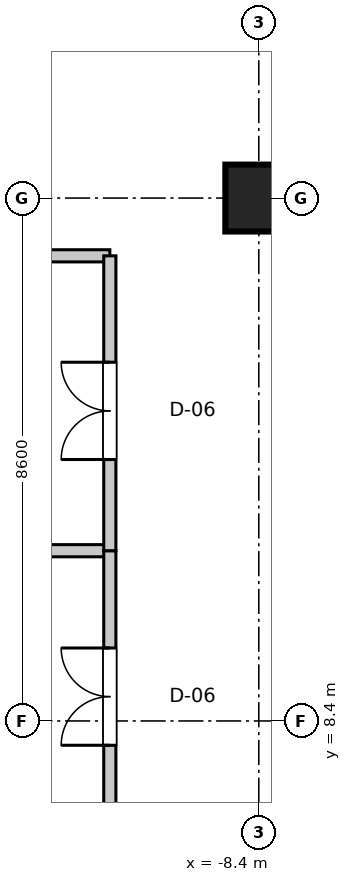
"""IFC4 building model, lengths in metres.
Left out: names, types, materials, properties, quantities, classifications, styles, units other than length and angle.
Written with IfcOpenShell. Run it as: python <this file> out.ifc"""

import sys

from ifc_helpers import new_model, si_unit, direction, frame, frame_2d, origin, origin_2d, place, context, subcontext, project, spatial, rectangle, extrude, source, transform, mapped, element, fill, save


model = new_model("IFC4")
c1 = context("Model", 3, precision=1e-05, world=origin(), true_north=direction((0.0, 1.0)))
c2 = subcontext(c1, "Body", "Model", "MODEL_VIEW")
j1 = project(units=[si_unit("LENGTHUNIT", "METRE"), si_unit("PLANEANGLEUNIT", "RADIAN")], contexts=[c1])
p1 = place(None, origin())
s1 = spatial("IfcSite", under=j1, at=p1, CompositionType="ELEMENT")
p2 = place(p1, origin())
s2 = spatial("IfcBuilding", under=s1, at=p2, CompositionType="ELEMENT")
p3 = place(p2, frame((0.0, 0.0, 200.1)))
s3 = spatial("IfcBuildingStorey", under=s2, at=p3, CompositionType="ELEMENT", Elevation=200.1)
m1 = source(origin(), c2, "Body", "SweptSolid", [
    extrude(rectangle(XDim=1.1, YDim=1.1, at=origin_2d()), origin(), (0.0, 0.0, 1.0), 4.755),
])
p4 = place(p3, frame((-8.4, 17.0, 0.0), z_axis=(0.0, 0.0, 1.0), x_axis=(1.0, 0.0, 0.0)))
e1 = element("IfcColumn", 1, at=p4, inside=s3, PredefinedType="COLUMN", context=c2, shape_type="MappedRepresentation", body=[
    mapped(m1, transform((0.0, 0.0, 0.0), scale=1.0)),
])
m2 = source(origin(), c2, "Body", "SweptSolid", [
    extrude(rectangle(XDim=11.37, YDim=0.2, at=frame_2d((5.685, 0.0))), origin(), (0.0, 0.0, 1.0), 3.4),
])
p5 = place(p3, frame((-22.22, 11.2, 0.0), z_axis=(0.0, 0.0, 1.0), x_axis=(1.0, 0.0, 0.0)))
e2 = element("IfcWall", 2, at=p5, inside=s3, PredefinedType="PARTITIONING", context=c2, shape_type="MappedRepresentation", body=[
    mapped(m2, transform((0.0, 0.0, 0.0), scale=1.0)),
])
m3 = source(origin(), c2, "Body", "SweptSolid", [
    extrude(rectangle(XDim=4.75, YDim=0.2, at=frame_2d((2.375, 0.0))), origin(), (0.0, 0.0, 1.0), 3.4),
])
p6 = place(p3, frame((-10.85, 6.45, 0.0), z_axis=(0.0, 0.0, 1.0), x_axis=(0.0, 1.0, 0.0)))
e3 = element("IfcWall", 3, at=p6, inside=s3, PredefinedType="PARTITIONING", context=c2, shape_type="MappedRepresentation", body=[
    mapped(m3, transform((0.0, 0.0, 0.0), scale=1.0)),
])
p7 = place(p6, frame((1.55, 0.0, 0.0)))
e4 = element("IfcOpeningElement", 4, at=p7, cuts=e3, PredefinedType="OPENING", context=c2, shape_type="SweptSolid", body=[
    extrude(rectangle(XDim=1.6, YDim=2.15, at=frame_2d((0.8, 1.075))), frame((0.0, 0.11, 0.0), z_axis=(0.0, -1.0, 0.0), x_axis=(1.0, 0.0, 0.0)), (0.0, 0.0, 1.0), 0.22),
])
p8 = place(p3, frame((-22.22, 16.05, 0.0), z_axis=(0.0, 0.0, 1.0), x_axis=(1.0, 0.0, 0.0)))
e5 = element("IfcWall", 5, at=p8, inside=s3, PredefinedType="PARTITIONING", context=c2, shape_type="MappedRepresentation", body=[
    mapped(m2, transform((0.0, 0.0, 0.0), scale=1.0)),
])
m4 = source(origin(), c2, "Body", "SweptSolid", [
    extrude(rectangle(XDim=4.85, YDim=0.2, at=frame_2d((2.425, 0.0))), origin(), (0.0, 0.0, 1.0), 3.4),
])
p9 = place(p3, frame((-10.85, 11.2, 0.0), z_axis=(0.0, 0.0, 1.0), x_axis=(0.0, 1.0, 0.0)))
e6 = element("IfcWall", 6, at=p9, inside=s3, PredefinedType="PARTITIONING", context=c2, shape_type="MappedRepresentation", body=[
    mapped(m4, transform((0.0, 0.0, 0.0), scale=1.0)),
])
p10 = place(p9, frame((1.5, 0.0, 0.0)))
e7 = element("IfcOpeningElement", 7, at=p10, cuts=e6, PredefinedType="OPENING", context=c2, shape_type="SweptSolid", body=[
    extrude(rectangle(XDim=1.6, YDim=2.15, at=frame_2d((0.8, 1.075))), frame((0.0, 0.11, 0.0), z_axis=(0.0, -1.0, 0.0), x_axis=(1.0, 0.0, 0.0)), (0.0, 0.0, 1.0), 0.22),
])
m5 = source(origin(), c2, "Body", "SweptSolid", [
    extrude(rectangle(XDim=1.6, YDim=2.15, at=frame_2d((0.8, 1.075))), frame((0.0, 0.025, 0.0), z_axis=(0.0, -1.0, 0.0), x_axis=(1.0, 0.0, 0.0)), (0.0, 0.0, 1.0), 0.05),
])
p11 = place(p7, origin())
e8 = element("IfcDoor", 8, at=p11, inside=s3, OperationType="DOUBLE_DOOR_SINGLE_SWING", PredefinedType="DOOR", context=c2, shape_type="MappedRepresentation", body=[
    mapped(m5, transform((0.0, 0.0, 0.0), scale=1.0)),
])
fill(e4, e8)
p12 = place(p10, origin())
e9 = element("IfcDoor", 9, at=p12, inside=s3, OperationType="DOUBLE_DOOR_SINGLE_SWING", PredefinedType="DOOR", context=c2, shape_type="MappedRepresentation", body=[
    mapped(m5, transform((0.0, 0.0, 0.0), scale=1.0)),
])
fill(e7, e9)
save(model, sys.argv[1])
